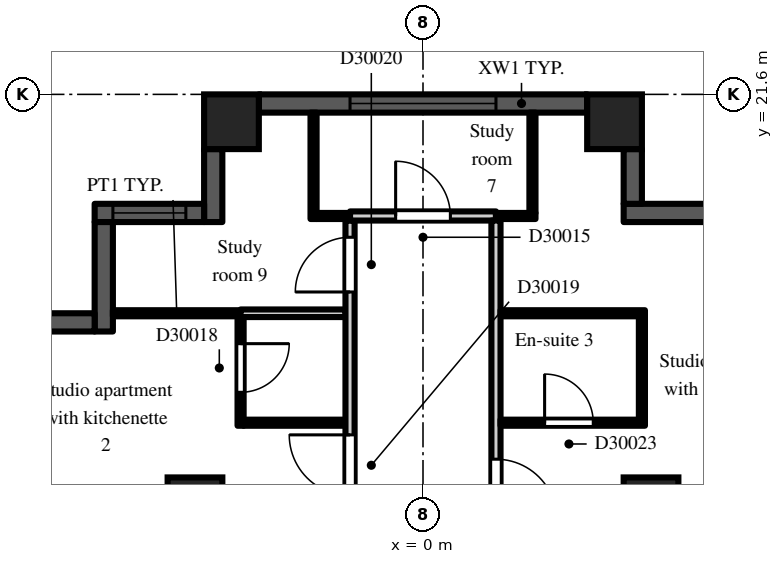
"""IFC4 building model, lengths in metres.
Left out: names, types, materials, properties, quantities, classifications, styles, units other than length and angle.
Written with IfcOpenShell. Run it as: python <this file> out.ifc"""

import sys

from ifc_helpers import new_model, si_unit, direction, frame, frame_2d, origin, origin_2d, place, context, subcontext, project, spatial, rectangle, extrude, element, fill, save


model = new_model("IFC4")
c1 = context("Model", 3, precision=1e-05, world=origin(), true_north=direction((0.0, 1.0)))
c2 = subcontext(c1, "Body", "Model", "MODEL_VIEW")
j1 = project(units=[si_unit("LENGTHUNIT", "METRE"), si_unit("PLANEANGLEUNIT", "RADIAN")], contexts=[c1])
p1 = place(None, origin())
s1 = spatial("IfcSite", under=j1, at=p1, CompositionType="ELEMENT")
p2 = place(p1, origin())
s2 = spatial("IfcBuilding", under=s1, at=p2, CompositionType="ELEMENT")
p3 = place(p2, frame((0.0, 0.0, 207.9)))
s3 = spatial("IfcBuildingStorey", under=s2, at=p3, CompositionType="ELEMENT", Elevation=207.9)
for number, where, z_axis, x_axis in (
    (1, (-3.75, 14.85, 0.0), (0.0, 0.0, 1.0), (1.0, 0.0, 0.0)),
    (2, (-3.15, 21.15, 0.0), (0.0, 0.0, 1.0), (1.0, 0.0, 0.0)),
    (3, (3.15, 21.15, 0.0), (0.0, 0.0, 1.0), (1.0, 0.0, 0.0)),
    (4, (3.75, 14.85, 0.0), (0.0, 0.0, 1.0), (1.0, 0.0, 0.0)),
):
    element("IfcColumn", number, at=place(p3, frame(where, z_axis=z_axis, x_axis=x_axis)), inside=s3, PredefinedType="COLUMN", context=c2, shape_type="SweptSolid", body=[
        extrude(rectangle(XDim=0.9, YDim=0.9, at=origin_2d()), origin(), (0.0, 0.0, 1.0), 3.0),
    ])
p4 = place(p3, frame((5.1, 19.65, 0.0), z_axis=(0.0, 0.0, 1.0), x_axis=(-1.0, 0.0, 0.0)))
e5 = element("IfcWall", 5, at=p4, inside=s3, PredefinedType="SOLIDWALL", context=c2, shape_type="SweptSolid", body=[
    extrude(rectangle(XDim=1.8, YDim=0.3, at=frame_2d((0.9, 0.0))), origin(), (0.0, 0.0, 1.0), 2.6),
])
p5 = place(p3, frame((3.45, 19.8, 0.0), z_axis=(0.0, 0.0, 1.0), x_axis=(0.0, 1.0, 0.0)))
e6 = element("IfcWall", 6, at=p5, inside=s3, PredefinedType="SOLIDWALL", context=c2, shape_type="SweptSolid", body=[
    extrude(rectangle(XDim=0.9, YDim=0.3, at=frame_2d((0.45, 0.0))), origin(), (0.0, 0.0, 1.0), 2.6),
])
p6 = place(p3, frame((2.7, 21.45, 0.0), z_axis=(0.0, 0.0, 1.0), x_axis=(-1.0, 0.0, 0.0)))
e7 = element("IfcWall", 7, at=p6, inside=s3, PredefinedType="SOLIDWALL", context=c2, shape_type="SweptSolid", body=[
    extrude(rectangle(XDim=5.4, YDim=0.3, at=frame_2d((2.7, 0.0))), origin(), (0.0, 0.0, 1.0), 2.3),
])
p7 = place(p6, frame((1.5, 0.0, 0.2)))
e8 = element("IfcOpeningElement", 8, at=p7, cuts=e7, PredefinedType="OPENING", context=c2, shape_type="SweptSolid", body=[
    extrude(rectangle(XDim=2.4, YDim=1.85, at=frame_2d((1.2, 0.925))), frame((0.0, 0.16, 0.0), z_axis=(0.0, -1.0, 0.0), x_axis=(1.0, 0.0, 0.0)), (0.0, 0.0, 1.0), 0.32),
])
p8 = place(p3, frame((-3.45, 20.7, 0.0), z_axis=(0.0, 0.0, 1.0), x_axis=(0.0, -1.0, 0.0)))
e9 = element("IfcWall", 9, at=p8, inside=s3, PredefinedType="SOLIDWALL", context=c2, shape_type="SweptSolid", body=[
    extrude(rectangle(XDim=1.2, YDim=0.3, at=frame_2d((0.6, 0.0))), origin(), (0.0, 0.0, 1.0), 2.6),
])
p9 = place(p3, frame((-3.6, 19.65, 0.0), z_axis=(0.0, 0.0, 1.0), x_axis=(-1.0, 0.0, 0.0)))
e10 = element("IfcWall", 10, at=p9, inside=s3, PredefinedType="SOLIDWALL", context=c2, shape_type="SweptSolid", body=[
    extrude(rectangle(XDim=1.8, YDim=0.3, at=frame_2d((0.9, 0.0))), origin(), (0.0, 0.0, 1.0), 2.6),
])
p10 = place(p9, frame((0.3, 0.0, 0.2)))
e11 = element("IfcOpeningElement", 11, at=p10, cuts=e10, PredefinedType="OPENING", context=c2, shape_type="SweptSolid", body=[
    extrude(rectangle(XDim=1.2, YDim=1.85, at=frame_2d((0.6, 0.925))), frame((0.0, 0.16, 0.0), z_axis=(0.0, -1.0, 0.0), x_axis=(1.0, 0.0, 0.0)), (0.0, 0.0, 1.0), 0.32),
])
p11 = place(p3, frame((-5.25, 19.5, 0.0), z_axis=(0.0, 0.0, 1.0), x_axis=(0.0, -1.0, 0.0)))
e12 = element("IfcWall", 12, at=p11, inside=s3, PredefinedType="SOLIDWALL", context=c2, shape_type="SweptSolid", body=[
    extrude(rectangle(XDim=1.8, YDim=0.3, at=frame_2d((0.9, 0.0))), origin(), (0.0, 0.0, 1.0), 2.6),
])
p12 = place(p3, frame((-5.4, 17.85, 0.0), z_axis=(0.0, 0.0, 1.0), x_axis=(-1.0, 0.0, 0.0)))
e13 = element("IfcWall", 13, at=p12, inside=s3, PredefinedType="SOLIDWALL", context=c2, shape_type="SweptSolid", body=[
    extrude(rectangle(XDim=0.9, YDim=0.3, at=frame_2d((0.45, 0.0))), origin(), (0.0, 0.0, 1.0), 2.6),
])
p13 = place(p3, frame((-5.1, 18.0, 0.0), z_axis=(0.0, 0.0, 1.0), x_axis=(1.0, 0.0, 0.0)))
e14 = element("IfcWall", 14, at=p13, inside=s3, PredefinedType="PARTITIONING", context=c2, shape_type="SweptSolid", body=[
    extrude(rectangle(XDim=2.1, YDim=0.1, at=frame_2d((1.05, 0.0))), origin(), (0.0, 0.0, 1.0), 2.6),
])
p14 = place(p3, frame((-3.0, 16.15, 0.0), z_axis=(0.0, 0.0, 1.0), x_axis=(0.0, 1.0, 0.0)))
e15 = element("IfcWall", 15, at=p14, inside=s3, PredefinedType="PARTITIONING", context=c2, shape_type="SweptSolid", body=[
    extrude(rectangle(XDim=1.788, YDim=0.1, at=frame_2d((0.894, 0.0))), origin(), (0.0, 0.0, 1.0), 2.6),
])
p15 = place(p14, frame((0.55, 0.0, 0.0)))
e16 = element("IfcOpeningElement", 16, at=p15, cuts=e15, PredefinedType="OPENING", context=c2, shape_type="SweptSolid", body=[
    extrude(rectangle(XDim=0.8, YDim=2.1, at=frame_2d((0.4, 1.05))), frame((0.0, 0.06, 0.0), z_axis=(0.0, -1.0, 0.0), x_axis=(1.0, 0.0, 0.0)), (0.0, 0.0, 1.0), 0.12),
])
p16 = place(p3, frame((-2.95, 16.2, 0.0), z_axis=(0.0, 0.0, 1.0), x_axis=(1.0, 0.0, 0.0)))
e17 = element("IfcWall", 17, at=p16, inside=s3, PredefinedType="PARTITIONING", context=c2, shape_type="SweptSolid", body=[
    extrude(rectangle(XDim=1.675, YDim=0.1, at=frame_2d((0.837, 0.0))), origin(), (0.0, 0.0, 1.0), 2.6),
])
p17 = place(p3, frame((-3.0, 18.0, 0.0), z_axis=(0.0, 0.0, 1.0), x_axis=(1.0, 0.0, 0.0)))
e18 = element("IfcWall", 18, at=p17, inside=s3, PredefinedType="PARTITIONING", context=c2, shape_type="SweptSolid", body=[
    extrude(rectangle(XDim=1.725, YDim=0.125, at=frame_2d((0.863, 0.0))), origin(), (0.0, 0.0, 1.0), 2.6),
])
p18 = place(p3, frame((-1.8, 19.55, 0.0), z_axis=(0.0, 0.0, 1.0), x_axis=(0.0, 1.0, 0.0)))
e19 = element("IfcWall", 19, at=p18, inside=s3, PredefinedType="PARTITIONING", context=c2, shape_type="SweptSolid", body=[
    extrude(rectangle(XDim=1.75, YDim=0.1, at=frame_2d((0.875, 0.0))), origin(), (0.0, 0.0, 1.0), 2.6),
])
p19 = place(p3, frame((-1.75, 19.6, 0.0), z_axis=(0.0, 0.0, 1.0), x_axis=(1.0, 0.0, 0.0)))
e20 = element("IfcWall", 20, at=p19, inside=s3, PredefinedType="PARTITIONING", context=c2, shape_type="SweptSolid", body=[
    extrude(rectangle(XDim=0.55, YDim=0.1, at=frame_2d((0.275, 0.0))), origin(), (0.0, 0.0, 1.0), 2.6),
])
p20 = place(p3, frame((-1.2, 1.275, 0.0), z_axis=(0.0, 0.0, 1.0), x_axis=(0.0, 1.0, 0.0)))
e21 = element("IfcWall", 21, at=p20, inside=s3, PredefinedType="PARTITIONING", context=c2, shape_type="SweptSolid", body=[
    extrude(rectangle(XDim=18.25, YDim=0.15, at=frame_2d((9.125, 0.0))), origin(), (0.0, 0.0, 1.0), 2.6),
])
p21 = place(p20, frame((2.475, 0.0, 0.0)))
e22 = element("IfcOpeningElement", 22, at=p21, cuts=e21, PredefinedType="OPENING", context=c2, shape_type="SweptSolid", body=[
    extrude(rectangle(XDim=0.9, YDim=2.1, at=frame_2d((0.45, 1.05))), frame((0.0, 0.085, 0.0), z_axis=(0.0, -1.0, 0.0), x_axis=(1.0, 0.0, 0.0)), (0.0, 0.0, 1.0), 0.17),
])
p22 = place(p20, frame((11.275, 0.0, 0.0)))
e23 = element("IfcOpeningElement", 23, at=p22, cuts=e21, PredefinedType="OPENING", context=c2, shape_type="SweptSolid", body=[
    extrude(rectangle(XDim=0.9, YDim=2.1, at=frame_2d((0.45, 1.05))), frame((0.0, 0.085, 0.0), z_axis=(0.0, -1.0, 0.0), x_axis=(1.0, 0.0, 0.0)), (0.0, 0.0, 1.0), 0.17),
])
p23 = place(p20, frame((7.675, 0.0, 0.0)))
e24 = element("IfcOpeningElement", 24, at=p23, cuts=e21, PredefinedType="OPENING", context=c2, shape_type="SweptSolid", body=[
    extrude(rectangle(XDim=0.9, YDim=2.1, at=frame_2d((0.45, 1.05))), frame((0.0, 0.085, 0.0), z_axis=(0.0, -1.0, 0.0), x_axis=(1.0, 0.0, 0.0)), (0.0, 0.0, 1.0), 0.17),
])
p24 = place(p20, frame((13.725, 0.0, 0.0)))
e25 = element("IfcOpeningElement", 25, at=p24, cuts=e21, PredefinedType="OPENING", context=c2, shape_type="SweptSolid", body=[
    extrude(rectangle(XDim=1.0, YDim=2.1, at=frame_2d((0.5, 1.05))), frame((0.0, 0.085, 0.0), z_axis=(0.0, -1.0, 0.0), x_axis=(1.0, 0.0, 0.0)), (0.0, 0.0, 1.0), 0.17),
])
p25 = place(p20, frame((17.075, 0.0, 0.0)))
e26 = element("IfcOpeningElement", 26, at=p25, cuts=e21, PredefinedType="OPENING", context=c2, shape_type="SweptSolid", body=[
    extrude(rectangle(XDim=0.9, YDim=2.1, at=frame_2d((0.45, 1.05))), frame((0.0, 0.085, 0.0), z_axis=(0.0, -1.0, 0.0), x_axis=(1.0, 0.0, 0.0)), (0.0, 0.0, 1.0), 0.17),
])
p26 = place(p3, frame((-1.2, 19.6, 0.0), z_axis=(0.0, 0.0, 1.0), x_axis=(1.0, 0.0, 0.0)))
e27 = element("IfcWall", 27, at=p26, inside=s3, PredefinedType="PARTITIONING", context=c2, shape_type="SweptSolid", body=[
    extrude(rectangle(XDim=2.4, YDim=0.15, at=frame_2d((1.2, 0.0))), origin(), (0.0, 0.0, 1.0), 2.6),
])
p27 = place(p26, frame((0.75, 0.0, 0.0)))
e28 = element("IfcOpeningElement", 28, at=p27, cuts=e27, PredefinedType="OPENING", context=c2, shape_type="SweptSolid", body=[
    extrude(rectangle(XDim=0.9, YDim=2.1, at=frame_2d((0.45, 1.05))), frame((0.0, 0.085, 0.0), z_axis=(0.0, -1.0, 0.0), x_axis=(1.0, 0.0, 0.0)), (0.0, 0.0, 1.0), 0.17),
])
p28 = place(p3, frame((1.2, 1.125, 0.0), z_axis=(0.0, 0.0, 1.0), x_axis=(0.0, 1.0, 0.0)))
e29 = element("IfcWall", 29, at=p28, inside=s3, PredefinedType="PARTITIONING", context=c2, shape_type="SweptSolid", body=[
    extrude(rectangle(XDim=18.4, YDim=0.15, at=frame_2d((9.2, 0.0))), origin(), (0.0, 0.0, 1.0), 2.6),
])
p29 = place(p28, frame((2.625, 0.0, 0.0)))
e30 = element("IfcOpeningElement", 30, at=p29, cuts=e29, PredefinedType="OPENING", context=c2, shape_type="SweptSolid", body=[
    extrude(rectangle(XDim=0.9, YDim=2.1, at=frame_2d((0.45, 1.05))), frame((0.0, 0.085, 0.0), z_axis=(0.0, -1.0, 0.0), x_axis=(1.0, 0.0, 0.0)), (0.0, 0.0, 1.0), 0.17),
])
p30 = place(p28, frame((7.025, 0.0, 0.0)))
e31 = element("IfcOpeningElement", 31, at=p30, cuts=e29, PredefinedType="OPENING", context=c2, shape_type="SweptSolid", body=[
    extrude(rectangle(XDim=0.9, YDim=2.1, at=frame_2d((0.45, 1.05))), frame((0.0, 0.085, 0.0), z_axis=(0.0, -1.0, 0.0), x_axis=(1.0, 0.0, 0.0)), (0.0, 0.0, 1.0), 0.17),
])
p31 = place(p28, frame((10.625, 0.0, 0.0)))
e32 = element("IfcOpeningElement", 32, at=p31, cuts=e29, PredefinedType="OPENING", context=c2, shape_type="SweptSolid", body=[
    extrude(rectangle(XDim=0.9, YDim=2.1, at=frame_2d((0.45, 1.05))), frame((0.0, 0.085, 0.0), z_axis=(0.0, -1.0, 0.0), x_axis=(1.0, 0.0, 0.0)), (0.0, 0.0, 1.0), 0.17),
])
p32 = place(p28, frame((13.475, 0.0, 0.0)))
e33 = element("IfcOpeningElement", 33, at=p32, cuts=e29, PredefinedType="OPENING", context=c2, shape_type="SweptSolid", body=[
    extrude(rectangle(XDim=1.0, YDim=2.1, at=frame_2d((0.5, 1.05))), frame((0.0, 0.085, 0.0), z_axis=(0.0, -1.0, 0.0), x_axis=(1.0, 0.0, 0.0)), (0.0, 0.0, 1.0), 0.17),
])
p33 = place(p3, frame((1.275, 16.2, 0.0), z_axis=(0.0, 0.0, 1.0), x_axis=(1.0, 0.0, 0.0)))
e34 = element("IfcWall", 34, at=p33, inside=s3, PredefinedType="PARTITIONING", context=c2, shape_type="SweptSolid", body=[
    extrude(rectangle(XDim=2.375, YDim=0.1, at=frame_2d((1.188, 0.0))), origin(), (0.0, 0.0, 1.0), 2.6),
])
p34 = place(p33, frame((0.725, 0.0, 0.0)))
e35 = element("IfcOpeningElement", 35, at=p34, cuts=e34, PredefinedType="OPENING", context=c2, shape_type="SweptSolid", body=[
    extrude(rectangle(XDim=0.8, YDim=2.1, at=frame_2d((0.4, 1.05))), frame((0.0, 0.06, 0.0), z_axis=(0.0, -1.0, 0.0), x_axis=(1.0, 0.0, 0.0)), (0.0, 0.0, 1.0), 0.12),
])
p35 = place(p3, frame((1.275, 18.0, 0.0), z_axis=(0.0, 0.0, 1.0), x_axis=(1.0, 0.0, 0.0)))
e36 = element("IfcWall", 36, at=p35, inside=s3, PredefinedType="PARTITIONING", context=c2, shape_type="SweptSolid", body=[
    extrude(rectangle(XDim=2.375, YDim=0.1, at=frame_2d((1.188, 0.0))), origin(), (0.0, 0.0, 1.0), 2.6),
])
p36 = place(p3, frame((1.2, 19.6, 0.0), z_axis=(0.0, 0.0, 1.0), x_axis=(1.0, 0.0, 0.0)))
e37 = element("IfcWall", 37, at=p36, inside=s3, PredefinedType="PARTITIONING", context=c2, shape_type="SweptSolid", body=[
    extrude(rectangle(XDim=0.65, YDim=0.1, at=frame_2d((0.325, 0.0))), origin(), (0.0, 0.0, 1.0), 2.6),
])
p37 = place(p3, frame((1.8, 19.65, 0.0), z_axis=(0.0, 0.0, 1.0), x_axis=(0.0, 1.0, 0.0)))
e38 = element("IfcWall", 38, at=p37, inside=s3, PredefinedType="PARTITIONING", context=c2, shape_type="SweptSolid", body=[
    extrude(rectangle(XDim=1.65, YDim=0.1, at=frame_2d((0.825, 0.0))), origin(), (0.0, 0.0, 1.0), 2.6),
])
p38 = place(p3, frame((3.6, 16.25, 0.0), z_axis=(0.0, 0.0, 1.0), x_axis=(0.0, 1.0, 0.0)))
e39 = element("IfcWall", 39, at=p38, inside=s3, PredefinedType="PARTITIONING", context=c2, shape_type="SweptSolid", body=[
    extrude(rectangle(XDim=1.7, YDim=0.1, at=frame_2d((0.85, 0.0))), origin(), (0.0, 0.0, 1.0), 2.6),
])
p39 = place(p7, origin())
e40 = element("IfcWindow", 40, at=p39, inside=s3, PartitioningType="SINGLE_PANEL", PredefinedType="WINDOW", context=c2, shape_type="SweptSolid", body=[
    extrude(rectangle(XDim=2.4, YDim=1.85, at=frame_2d((1.2, 0.925))), frame((0.0, 0.03, 0.0), z_axis=(0.0, -1.0, 0.0), x_axis=(1.0, 0.0, 0.0)), (0.0, 0.0, 1.0), 0.06),
])
fill(e8, e40)
p40 = place(p10, origin())
e41 = element("IfcWindow", 41, at=p40, inside=s3, PartitioningType="SINGLE_PANEL", PredefinedType="WINDOW", context=c2, shape_type="SweptSolid", body=[
    extrude(rectangle(XDim=1.2, YDim=1.85, at=frame_2d((0.6, 0.925))), frame((0.0, 0.03, 0.0), z_axis=(0.0, -1.0, 0.0), x_axis=(1.0, 0.0, 0.0)), (0.0, 0.0, 1.0), 0.06),
])
fill(e11, e41)
p41 = place(p27, origin())
e42 = element("IfcDoor", 42, at=p41, inside=s3, OperationType="SINGLE_SWING_LEFT", PredefinedType="DOOR", context=c2, shape_type="SweptSolid", body=[
    extrude(rectangle(XDim=0.9, YDim=2.1, at=frame_2d((0.45, 1.05))), frame((0.0, 0.025, 0.0), z_axis=(0.0, -1.0, 0.0), x_axis=(1.0, 0.0, 0.0)), (0.0, 0.0, 1.0), 0.05),
])
fill(e28, e42)
p42 = place(p15, frame((0.8, 0.0, 0.0), z_axis=(0.0, 0.0, 1.0), x_axis=(-1.0, 0.0, 0.0)))
e43 = element("IfcDoor", 43, at=p42, inside=s3, OperationType="SINGLE_SWING_LEFT", PredefinedType="DOOR", context=c2, shape_type="SweptSolid", body=[
    extrude(rectangle(XDim=0.8, YDim=2.1, at=frame_2d((0.4, 1.05))), frame((0.0, 0.025, 0.0), z_axis=(0.0, -1.0, 0.0), x_axis=(1.0, 0.0, 0.0)), (0.0, 0.0, 1.0), 0.05),
])
fill(e16, e43)
p43 = place(p24, origin())
e44 = element("IfcDoor", 44, at=p43, inside=s3, OperationType="SINGLE_SWING_RIGHT", PredefinedType="DOOR", context=c2, shape_type="SweptSolid", body=[
    extrude(rectangle(XDim=1.0, YDim=2.1, at=frame_2d((0.5, 1.05))), frame((0.0, 0.025, 0.0), z_axis=(0.0, -1.0, 0.0), x_axis=(1.0, 0.0, 0.0)), (0.0, 0.0, 1.0), 0.05),
])
fill(e25, e44)
p44 = place(p25, origin())
e45 = element("IfcDoor", 45, at=p44, inside=s3, OperationType="SINGLE_SWING_LEFT", PredefinedType="DOOR", context=c2, shape_type="SweptSolid", body=[
    extrude(rectangle(XDim=0.9, YDim=2.1, at=frame_2d((0.45, 1.05))), frame((0.0, 0.025, 0.0), z_axis=(0.0, -1.0, 0.0), x_axis=(1.0, 0.0, 0.0)), (0.0, 0.0, 1.0), 0.05),
])
fill(e26, e45)
p45 = place(p34, origin())
e46 = element("IfcDoor", 46, at=p45, inside=s3, OperationType="SINGLE_SWING_LEFT", PredefinedType="DOOR", context=c2, shape_type="SweptSolid", body=[
    extrude(rectangle(XDim=0.8, YDim=2.1, at=frame_2d((0.4, 1.05))), frame((0.0, 0.025, 0.0), z_axis=(0.0, -1.0, 0.0), x_axis=(1.0, 0.0, 0.0)), (0.0, 0.0, 1.0), 0.05),
])
fill(e35, e46)
p46 = place(p32, frame((1.0, 0.0, 0.0), z_axis=(0.0, 0.0, 1.0), x_axis=(-1.0, 0.0, 0.0)))
e47 = element("IfcDoor", 47, at=p46, inside=s3, OperationType="SINGLE_SWING_RIGHT", PredefinedType="DOOR", context=c2, shape_type="SweptSolid", body=[
    extrude(rectangle(XDim=1.0, YDim=2.1, at=frame_2d((0.5, 1.05))), frame((0.0, 0.025, 0.0), z_axis=(0.0, -1.0, 0.0), x_axis=(1.0, 0.0, 0.0)), (0.0, 0.0, 1.0), 0.05),
])
fill(e33, e47)
save(model, sys.argv[1])
